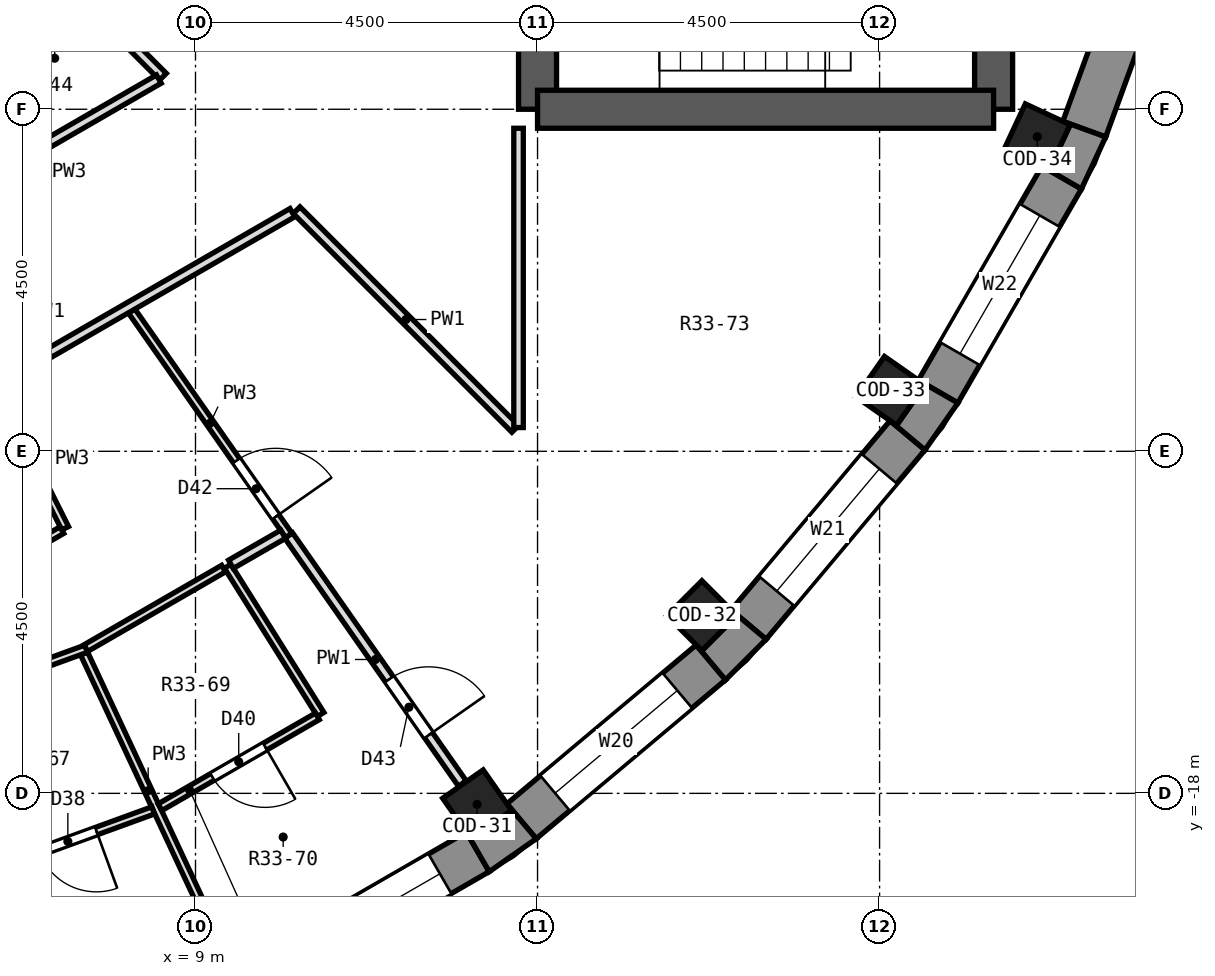
"""IFC4 building model, lengths in metres.
Left out: names, types, materials, properties, quantities, classifications, styles, units other than length and angle.
Written with IfcOpenShell. Run it as: python <this file> out.ifc"""

import sys

from ifc_helpers import new_model, si_unit, direction, frame, frame_2d, origin, origin_2d, place, context, subcontext, project, spatial, polyline, rectangle, outline, extrude, element, fill, save


model = new_model("IFC4")
c1 = context("Model", 3, precision=1e-05, world=origin(), true_north=direction((0.0, 1.0)))
c2 = subcontext(c1, "Body", "Model", "MODEL_VIEW")
j1 = project(units=[si_unit("LENGTHUNIT", "METRE"), si_unit("PLANEANGLEUNIT", "RADIAN")], contexts=[c1])
p1 = place(None, origin())
s1 = spatial("IfcSite", under=j1, at=p1, CompositionType="ELEMENT")
p2 = place(p1, origin())
s2 = spatial("IfcBuilding", under=s1, at=p2, CompositionType="ELEMENT")
p3 = place(p2, frame((0.0, 0.0, 229.7)))
s3 = spatial("IfcBuildingStorey", under=s2, at=p3, CompositionType="ELEMENT", Elevation=229.7)
for number, where, z_axis, x_axis in (
    (1, (12.705, -18.144, 0.0), (0.0, 0.0, 1.0), (0.574, -0.819, 0.0)),
    (2, (15.662, -15.662, 0.0), (0.0, 0.0, 1.0), (0.707, -0.707, 0.0)),
    (3, (18.144, -12.705, 0.0), (0.0, 0.0, 1.0), (0.819, -0.574, 0.0)),
    (4, (20.075, -9.361, 0.0), (0.0, 0.0, 1.0), (0.906, -0.423, 0.0)),
):
    element("IfcColumn", number, at=place(p3, frame(where, z_axis=z_axis, x_axis=x_axis)), inside=s3, PredefinedType="COLUMN", context=c2, shape_type="SweptSolid", body=[
        extrude(rectangle(XDim=0.65, YDim=0.65, at=origin_2d()), origin(), (0.0, 0.0, 1.0), 3.3),
    ])
p4 = place(p3, frame((13.5, -9.0, 0.0), z_axis=(0.0, 0.0, 1.0), x_axis=(0.0, 1.0, 0.0)))
e5 = element("IfcWall", 5, at=p4, inside=s3, PredefinedType="SHEAR", context=c2, shape_type="SweptSolid", body=[
    extrude(rectangle(XDim=18.0, YDim=0.5, at=frame_2d((9.0, 0.0))), origin(), (0.0, 0.0, 1.0), 3.3),
])
p5 = place(p4, frame((15.4, 0.0, 0.0)))
e6 = element("IfcOpeningElement", 6, at=p5, cuts=e5, PredefinedType="OPENING", context=c2, shape_type="SweptSolid", body=[
    extrude(rectangle(XDim=1.2, YDim=2.1, at=frame_2d((0.6, 1.05))), frame((0.0, 0.262, 0.0), z_axis=(0.0, -1.0, 0.0), x_axis=(1.0, 0.0, 0.0)), (0.0, 0.0, 1.0), 0.524),
])
p6 = place(p4, frame((1.4, 0.0, 0.0)))
e7 = element("IfcOpeningElement", 7, at=p6, cuts=e5, PredefinedType="OPENING", context=c2, shape_type="SweptSolid", body=[
    extrude(rectangle(XDim=1.2, YDim=2.1, at=frame_2d((0.6, 1.05))), frame((0.0, 0.262, 0.0), z_axis=(0.0, -1.0, 0.0), x_axis=(1.0, 0.0, 0.0)), (0.0, 0.0, 1.0), 0.524),
])
p7 = place(p4, frame((7.5, 0.0, 0.0)))
e8 = element("IfcOpeningElement", 8, at=p7, cuts=e5, PredefinedType="OPENING", context=c2, shape_type="SweptSolid", body=[
    extrude(rectangle(XDim=3.0, YDim=2.4, at=frame_2d((1.5, 1.2))), frame((0.0, 0.262, 0.0), z_axis=(0.0, -1.0, 0.0), x_axis=(1.0, 0.0, 0.0)), (0.0, 0.0, 1.0), 0.524),
])
p8 = place(p3, frame((19.5, -9.0, 0.0), z_axis=(0.0, 0.0, 1.0), x_axis=(0.0, 1.0, 0.0)))
e9 = element("IfcWall", 9, at=p8, inside=s3, PredefinedType="SHEAR", context=c2, shape_type="SweptSolid", body=[
    extrude(rectangle(XDim=18.0, YDim=0.5, at=frame_2d((9.0, 0.0))), origin(), (0.0, 0.0, 1.0), 3.3),
])
p9 = place(p8, frame((9.45, 0.0, 0.0)))
e10 = element("IfcOpeningElement", 10, at=p9, cuts=e9, PredefinedType="OPENING", context=c2, shape_type="SweptSolid", body=[
    extrude(rectangle(XDim=0.9, YDim=2.1, at=frame_2d((0.45, 1.05))), frame((0.0, 0.262, 0.0), z_axis=(0.0, -1.0, 0.0), x_axis=(1.0, 0.0, 0.0)), (0.0, 0.0, 1.0), 0.524),
])
p10 = place(p8, frame((7.65, 0.0, 0.0)))
e11 = element("IfcOpeningElement", 11, at=p10, cuts=e9, PredefinedType="OPENING", context=c2, shape_type="SweptSolid", body=[
    extrude(rectangle(XDim=0.9, YDim=2.1, at=frame_2d((0.45, 1.05))), frame((0.0, 0.262, 0.0), z_axis=(0.0, -1.0, 0.0), x_axis=(1.0, 0.0, 0.0)), (0.0, 0.0, 1.0), 0.524),
])
p11 = place(p3, frame((13.5, -9.0, 0.0), z_axis=(0.0, 0.0, 1.0), x_axis=(1.0, 0.0, 0.0)))
e12 = element("IfcWall", 12, at=p11, inside=s3, PredefinedType="SHEAR", context=c2, shape_type="SweptSolid", body=[
    extrude(rectangle(XDim=6.0, YDim=0.5, at=frame_2d((3.0, 0.0))), origin(), (0.0, 0.0, 1.0), 3.3),
])
p12 = place(p3, frame((9.898, -20.396, 0.0), z_axis=(0.0, 0.0, 1.0), x_axis=(0.866016800201, 0.500014901547, 0.0)))
e13 = element("IfcWall", 13, at=p12, inside=s3, PredefinedType="SOLIDWALL", context=c2, shape_type="SweptSolid", body=[
    extrude(rectangle(XDim=3.252, YDim=0.6, at=frame_2d((1.626, 0.0))), origin(), (0.0, 0.0, 1.0), 2.9),
])
p13 = place(p12, frame((0.576, 0.0, 0.9)))
e14 = element("IfcOpeningElement", 14, at=p13, cuts=e13, PredefinedType="OPENING", context=c2, shape_type="SweptSolid", body=[
    extrude(rectangle(XDim=2.1, YDim=1.8, at=frame_2d((1.05, 0.9))), frame((0.0, 0.312, 0.0), z_axis=(0.0, -1.0, 0.0), x_axis=(1.0, 0.0, 0.0)), (0.0, 0.0, 1.0), 0.624),
])
p14 = place(p3, frame((13.29, -18.367, 0.0), z_axis=(0.0, 0.0, 1.0), x_axis=(0.766056773982, 0.64277291405, 0.0)))
e15 = element("IfcWall", 15, at=p14, inside=s3, PredefinedType="SOLIDWALL", context=c2, shape_type="SweptSolid", body=[
    extrude(rectangle(XDim=3.252, YDim=0.6, at=frame_2d((1.626, 0.0))), origin(), (0.0, 0.0, 1.0), 2.9),
])
p15 = place(p14, frame((0.576, 0.0, 0.9)))
e16 = element("IfcOpeningElement", 16, at=p15, cuts=e15, PredefinedType="OPENING", context=c2, shape_type="SweptSolid", body=[
    extrude(rectangle(XDim=2.1, YDim=1.8, at=frame_2d((1.05, 0.9))), frame((0.0, 0.312, 0.0), z_axis=(0.0, -1.0, 0.0), x_axis=(1.0, 0.0, 0.0)), (0.0, 0.0, 1.0), 0.624),
])
p16 = place(p3, frame((16.277, -15.781, 0.0), z_axis=(0.0, 0.0, 1.0), x_axis=(0.64277291405, 0.766056773982, 0.0)))
e17 = element("IfcWall", 17, at=p16, inside=s3, PredefinedType="SOLIDWALL", context=c2, shape_type="SweptSolid", body=[
    extrude(rectangle(XDim=3.252, YDim=0.6, at=frame_2d((1.626, 0.0))), origin(), (0.0, 0.0, 1.0), 2.9),
])
p17 = place(p16, frame((0.576, 0.0, 0.9)))
e18 = element("IfcOpeningElement", 18, at=p17, cuts=e17, PredefinedType="OPENING", context=c2, shape_type="SweptSolid", body=[
    extrude(rectangle(XDim=2.1, YDim=1.8, at=frame_2d((1.05, 0.9))), frame((0.0, 0.312, 0.0), z_axis=(0.0, -1.0, 0.0), x_axis=(1.0, 0.0, 0.0)), (0.0, 0.0, 1.0), 0.624),
])
p18 = place(p3, frame((18.77, -12.714, 0.0), z_axis=(0.0, 0.0, 1.0), x_axis=(0.500014901547, 0.866016800201, 0.0)))
e19 = element("IfcWall", 19, at=p18, inside=s3, PredefinedType="SOLIDWALL", context=c2, shape_type="SweptSolid", body=[
    extrude(rectangle(XDim=3.252, YDim=0.6, at=frame_2d((1.626, 0.0))), origin(), (0.0, 0.0, 1.0), 2.9),
])
p19 = place(p18, frame((0.576, 0.0, 0.9)))
e20 = element("IfcOpeningElement", 20, at=p19, cuts=e19, PredefinedType="OPENING", context=c2, shape_type="SweptSolid", body=[
    extrude(rectangle(XDim=2.1, YDim=1.8, at=frame_2d((1.05, 0.9))), frame((0.0, 0.312, 0.0), z_axis=(0.0, -1.0, 0.0), x_axis=(1.0, 0.0, 0.0)), (0.0, 0.0, 1.0), 0.624),
])
p20 = place(p3, frame((20.693, -9.262, 0.0), z_axis=(0.0, 0.0, 1.0), x_axis=(0.342056509473, 0.939679383794, 0.0)))
e21 = element("IfcWall", 21, at=p20, inside=s3, PredefinedType="SOLIDWALL", context=c2, shape_type="SweptSolid", body=[
    extrude(rectangle(XDim=3.252, YDim=0.6, at=frame_2d((1.626, 0.0))), origin(), (0.0, 0.0, 1.0), 2.9),
])
p21 = place(p3, origin())
e22 = element("IfcWall", 22, at=p21, inside=s3, PredefinedType="SOLIDWALL", context=c2, shape_type="SweptSolid", body=[
    extrude(outline(polyline([(12.864, -19.03), (13.482, -18.597), (13.097, -18.137), (13.157, -18.224), (12.625, -18.597), (12.564, -18.51), (12.864, -19.03)])), origin(), (0.0, 0.0, 1.0), 2.9),
])
p22 = place(p3, origin())
e23 = element("IfcWall", 23, at=p22, inside=s3, PredefinedType="SOLIDWALL", context=c2, shape_type="SweptSolid", body=[
    extrude(outline(polyline([(16.507, -15.973), (16.047, -15.588), (16.122, -15.662), (15.662, -16.122), (15.588, -16.047), (15.973, -16.507), (16.507, -15.973)])), origin(), (0.0, 0.0, 1.0), 2.9),
])
p23 = place(p3, origin())
e24 = element("IfcWall", 24, at=p23, inside=s3, PredefinedType="SOLIDWALL", context=c2, shape_type="SweptSolid", body=[
    extrude(outline(polyline([(19.03, -12.864), (18.51, -12.564), (18.597, -12.625), (18.224, -13.157), (18.137, -13.097), (18.597, -13.482), (19.03, -12.864)])), origin(), (0.0, 0.0, 1.0), 2.9),
])
p24 = place(p3, origin())
e25 = element("IfcWall", 25, at=p24, inside=s3, PredefinedType="SOLIDWALL", context=c2, shape_type="SweptSolid", body=[
    extrude(outline(polyline([(20.656, -10.048), (20.975, -9.364), (20.411, -9.159), (20.507, -9.204), (20.232, -9.793), (20.136, -9.748), (20.656, -10.048)])), origin(), (0.0, 0.0, 1.0), 2.9),
])
p25 = place(p3, frame((7.534, -16.16, 0.0), z_axis=(0.0, 0.0, 1.0), x_axis=(0.423136981181, -0.90606572342, 0.0)))
e26 = element("IfcWall", 26, at=p25, inside=s3, PredefinedType="PARTITIONING", context=c2, shape_type="SweptSolid", body=[
    extrude(rectangle(XDim=3.985, YDim=0.1, at=frame_2d((1.993, 0.0))), origin(), (0.0, 0.0, 1.0), 2.9),
])
p26 = place(p3, frame((6.369, -12.688, 0.0), z_axis=(0.0, 0.0, 1.0), x_axis=(0.448648311547, -0.893708393463, 0.0)))
e27 = element("IfcWall", 27, at=p26, inside=s3, PredefinedType="PARTITIONING", context=c2, shape_type="SweptSolid", body=[
    extrude(rectangle(XDim=2.041, YDim=0.1, at=frame_2d((1.021, 0.0))), origin(), (0.0, 0.0, 1.0), 2.9),
])
p27 = place(p3, frame((9.423, -15.012, 0.0), z_axis=(0.0, 0.0, 1.0), x_axis=(0.531608930636, -0.846989931975, 0.0)))
e28 = element("IfcWall", 28, at=p27, inside=s3, PredefinedType="PARTITIONING", context=c2, shape_type="SweptSolid", body=[
    extrude(rectangle(XDim=2.302, YDim=0.1, at=frame_2d((1.151, 0.0))), origin(), (0.0, 0.0, 1.0), 2.9),
])
p28 = place(p3, frame((10.225, -14.607, 0.0), z_axis=(0.0, 0.0, 1.0), x_axis=(0.573696694948, -0.819067825156, 0.0)))
e29 = element("IfcWall", 29, at=p28, inside=s3, PredefinedType="PARTITIONING", context=c2, shape_type="SweptSolid", body=[
    extrude(rectangle(XDim=3.985, YDim=0.125, at=frame_2d((1.992, 0.0))), origin(), (0.0, 0.0, 1.0), 2.9),
])
p29 = place(p28, frame((2.309, 0.0, 0.0)))
e30 = element("IfcOpeningElement", 30, at=p29, cuts=e29, PredefinedType="OPENING", context=c2, shape_type="SweptSolid", body=[
    extrude(rectangle(XDim=0.9, YDim=2.1, at=frame_2d((0.45, 1.05))), frame((0.0, 0.074, 0.0), z_axis=(0.0, -1.0, 0.0), x_axis=(1.0, 0.0, 0.0)), (0.0, 0.0, 1.0), 0.149),
])
p30 = place(p3, frame((8.16, -11.654, 0.0), z_axis=(0.0, 0.0, 1.0), x_axis=(0.573580547772, -0.819149165426, 0.0)))
e31 = element("IfcWall", 31, at=p30, inside=s3, PredefinedType="PARTITIONING", context=c2, shape_type="SweptSolid", body=[
    extrude(rectangle(XDim=3.604, YDim=0.1, at=frame_2d((1.802, 0.0))), origin(), (0.0, 0.0, 1.0), 2.9),
])
p31 = place(p30, frame((2.405, 0.0, 0.0)))
e32 = element("IfcOpeningElement", 32, at=p31, cuts=e31, PredefinedType="OPENING", context=c2, shape_type="SweptSolid", body=[
    extrude(rectangle(XDim=0.9, YDim=2.1, at=frame_2d((0.45, 1.05))), frame((0.0, 0.062, 0.0), z_axis=(0.0, -1.0, 0.0), x_axis=(1.0, 0.0, 0.0)), (0.0, 0.0, 1.0), 0.124),
])
p32 = place(p3, frame((6.677, -6.677, 0.0), z_axis=(0.0, 0.0, 1.0), x_axis=(0.707106781187, -0.707106781187, 0.0)))
e33 = element("IfcWall", 33, at=p32, inside=s3, PredefinedType="PARTITIONING", context=c2, shape_type="SweptSolid", body=[
    extrude(rectangle(XDim=2.68, YDim=0.125, at=frame_2d((1.34, 0.0))), origin(), (0.0, 0.0, 1.0), 2.9),
])
p33 = place(p3, frame((10.33, -10.328, 0.0), z_axis=(0.0, 0.0, 1.0), x_axis=(0.707076776443, -0.707136784657, 0.0)))
e34 = element("IfcWall", 34, at=p33, inside=s3, PredefinedType="PARTITIONING", context=c2, shape_type="SweptSolid", body=[
    extrude(rectangle(XDim=4.068, YDim=0.125, at=frame_2d((2.034, 0.0))), origin(), (0.0, 0.0, 1.0), 2.9),
])
p34 = place(p3, frame((6.197, -19.042, 0.0), z_axis=(0.0, 0.0, 1.0), x_axis=(0.939644231496, 0.342153062556, 0.0)))
e35 = element("IfcWall", 35, at=p34, inside=s3, PredefinedType="PARTITIONING", context=c2, shape_type="SweptSolid", body=[
    extrude(rectangle(XDim=2.39, YDim=0.1, at=frame_2d((1.195, 0.0))), origin(), (0.0, 0.0, 1.0), 2.9),
])
p35 = place(p34, frame((0.796, 0.0, 0.0)))
e36 = element("IfcOpeningElement", 36, at=p35, cuts=e35, PredefinedType="OPENING", context=c2, shape_type="SweptSolid", body=[
    extrude(rectangle(XDim=0.8, YDim=2.1, at=frame_2d((0.4, 1.05))), frame((0.0, 0.062, 0.0), z_axis=(0.0, -1.0, 0.0), x_axis=(1.0, 0.0, 0.0)), (0.0, 0.0, 1.0), 0.124),
])
p36 = place(p3, frame((5.49, -16.851, 0.0), z_axis=(0.0, 0.0, 1.0), x_axis=(0.939680214162, 0.342054228323, 0.0)))
e37 = element("IfcWall", 37, at=p36, inside=s3, PredefinedType="PARTITIONING", context=c2, shape_type="SweptSolid", body=[
    extrude(rectangle(XDim=2.205, YDim=0.1, at=frame_2d((1.103, 0.0))), origin(), (0.0, 0.0, 1.0), 2.9),
])
p37 = place(p3, frame((9.466, -14.986, 0.0), z_axis=(0.0, 0.0, 1.0), x_axis=(0.866569975824, 0.499055585082, 0.0)))
e38 = element("IfcWall", 38, at=p37, inside=s3, PredefinedType="PARTITIONING", context=c2, shape_type="SweptSolid", body=[
    extrude(rectangle(XDim=0.792, YDim=0.125, at=frame_2d((0.396, 0.0))), origin(), (0.0, 0.0, 1.0), 2.9),
])
p38 = place(p3, frame((8.533, -18.182, 0.0), z_axis=(0.0, 0.0, 1.0), x_axis=(0.866136275394, 0.49980791555, 0.0)))
e39 = element("IfcWall", 39, at=p38, inside=s3, PredefinedType="PARTITIONING", context=c2, shape_type="SweptSolid", body=[
    extrude(rectangle(XDim=2.391, YDim=0.1, at=frame_2d((1.195, 0.0))), origin(), (0.0, 0.0, 1.0), 2.9),
])
p39 = place(p38, frame((0.795, 0.0, 0.0)))
e40 = element("IfcOpeningElement", 40, at=p39, cuts=e39, PredefinedType="OPENING", context=c2, shape_type="SweptSolid", body=[
    extrude(rectangle(XDim=0.8, YDim=2.1, at=frame_2d((0.4, 1.05))), frame((0.0, 0.062, 0.0), z_axis=(0.0, -1.0, 0.0), x_axis=(1.0, 0.0, 0.0)), (0.0, 0.0, 1.0), 0.124),
])
p40 = place(p3, frame((7.557, -16.089, 0.0), z_axis=(0.0, 0.0, 1.0), x_axis=(0.866022320763, 0.500005339912, 0.0)))
e41 = element("IfcWall", 41, at=p40, inside=s3, PredefinedType="PARTITIONING", context=c2, shape_type="SweptSolid", body=[
    extrude(rectangle(XDim=2.092, YDim=0.1, at=frame_2d((1.046, 0.0))), origin(), (0.0, 0.0, 1.0), 2.9),
])
p41 = place(p3, frame((5.419, -15.589, 0.0), z_axis=(0.0, 0.0, 1.0), x_axis=(0.866071606143, 0.499919966627, 0.0)))
e42 = element("IfcWall", 42, at=p41, inside=s3, PredefinedType="PARTITIONING", context=c2, shape_type="SweptSolid", body=[
    extrude(rectangle(XDim=2.104, YDim=0.1, at=frame_2d((1.052, 0.0))), origin(), (0.0, 0.0, 1.0), 2.9),
])
p42 = place(p41, frame((0.652, 0.0, 0.0)))
e43 = element("IfcOpeningElement", 43, at=p42, cuts=e42, PredefinedType="OPENING", context=c2, shape_type="SweptSolid", body=[
    extrude(rectangle(XDim=0.8, YDim=2.1, at=frame_2d((0.4, 1.05))), frame((0.0, 0.062, 0.0), z_axis=(0.0, -1.0, 0.0), x_axis=(1.0, 0.0, 0.0)), (0.0, 0.0, 1.0), 0.124),
])
p43 = place(p3, frame((3.835, -14.079, 0.0), z_axis=(0.0, 0.0, 1.0), x_axis=(0.865993671729, 0.500054957505, 0.0)))
e44 = element("IfcWall", 44, at=p43, inside=s3, PredefinedType="PARTITIONING", context=c2, shape_type="SweptSolid", body=[
    extrude(rectangle(XDim=7.436, YDim=0.125, at=frame_2d((3.718, 0.0))), origin(), (0.0, 0.0, 1.0), 2.9),
])
p44 = place(p3, frame((3.203, -11.673, 0.0), z_axis=(0.0, 0.0, 1.0), x_axis=(0.865972267571, 0.50009202333, 0.0)))
e45 = element("IfcWall", 45, at=p44, inside=s3, PredefinedType="PARTITIONING", context=c2, shape_type="SweptSolid", body=[
    extrude(rectangle(XDim=6.137, YDim=0.125, at=frame_2d((3.069, 0.0))), origin(), (0.0, 0.0, 1.0), 2.9),
])
p45 = place(p44, frame((2.512, 0.0, 0.0)))
e46 = element("IfcOpeningElement", 46, at=p45, cuts=e45, PredefinedType="OPENING", context=c2, shape_type="SweptSolid", body=[
    extrude(rectangle(XDim=1.0, YDim=2.1, at=frame_2d((0.5, 1.05))), frame((0.0, 0.074, 0.0), z_axis=(0.0, -1.0, 0.0), x_axis=(1.0, 0.0, 0.0)), (0.0, 0.0, 1.0), 0.149),
])
p46 = place(p3, frame((13.25, -13.188, 0.0), z_axis=(0.0, 0.0, 1.0), x_axis=(0.0, 1.0, 0.0)))
e47 = element("IfcWall", 47, at=p46, inside=s3, PredefinedType="PARTITIONING", context=c2, shape_type="SweptSolid", body=[
    extrude(rectangle(XDim=3.938, YDim=0.125, at=frame_2d((1.969, 0.0))), origin(), (0.0, 0.0, 1.0), 2.9),
])
p47 = place(p13, origin())
e48 = element("IfcWindow", 48, at=p47, inside=s3, PartitioningType="SINGLE_PANEL", PredefinedType="WINDOW", context=c2, shape_type="SweptSolid", body=[
    extrude(rectangle(XDim=2.1, YDim=1.8, at=frame_2d((1.05, 0.9))), frame((0.0, 0.18, 0.0), z_axis=(0.0, -1.0, 0.0), x_axis=(1.0, 0.0, 0.0)), (0.0, 0.0, 1.0), 0.06),
])
fill(e14, e48)
p48 = place(p15, origin())
e49 = element("IfcWindow", 49, at=p48, inside=s3, PartitioningType="SINGLE_PANEL", PredefinedType="WINDOW", context=c2, shape_type="SweptSolid", body=[
    extrude(rectangle(XDim=2.1, YDim=1.8, at=frame_2d((1.05, 0.9))), frame((0.0, 0.18, 0.0), z_axis=(0.0, -1.0, 0.0), x_axis=(1.0, 0.0, 0.0)), (0.0, 0.0, 1.0), 0.06),
])
fill(e16, e49)
p49 = place(p17, origin())
e50 = element("IfcWindow", 50, at=p49, inside=s3, PartitioningType="SINGLE_PANEL", PredefinedType="WINDOW", context=c2, shape_type="SweptSolid", body=[
    extrude(rectangle(XDim=2.1, YDim=1.8, at=frame_2d((1.05, 0.9))), frame((0.0, 0.18, 0.0), z_axis=(0.0, -1.0, 0.0), x_axis=(1.0, 0.0, 0.0)), (0.0, 0.0, 1.0), 0.06),
])
fill(e18, e50)
p50 = place(p19, origin())
e51 = element("IfcWindow", 51, at=p50, inside=s3, PartitioningType="SINGLE_PANEL", PredefinedType="WINDOW", context=c2, shape_type="SweptSolid", body=[
    extrude(rectangle(XDim=2.1, YDim=1.8, at=frame_2d((1.05, 0.9))), frame((0.0, 0.18, 0.0), z_axis=(0.0, -1.0, 0.0), x_axis=(1.0, 0.0, 0.0)), (0.0, 0.0, 1.0), 0.06),
])
fill(e20, e51)
p51 = place(p35, frame((0.8, 0.0, 0.0), z_axis=(0.0, 0.0, 1.0), x_axis=(-1.0, 0.0, 0.0)))
e52 = element("IfcDoor", 52, at=p51, inside=s3, OperationType="SINGLE_SWING_LEFT", PredefinedType="DOOR", context=c2, shape_type="SweptSolid", body=[
    extrude(rectangle(XDim=0.8, YDim=2.1, at=frame_2d((0.4, 1.05))), frame((0.0, 0.025, 0.0), z_axis=(0.0, -1.0, 0.0), x_axis=(1.0, 0.0, 0.0)), (0.0, 0.0, 1.0), 0.05),
])
fill(e36, e52)
p52 = place(p39, frame((0.8, 0.0, 0.0), z_axis=(0.0, 0.0, 1.0), x_axis=(-1.0, 0.0, 0.0)))
e53 = element("IfcDoor", 53, at=p52, inside=s3, OperationType="SINGLE_SWING_LEFT", PredefinedType="DOOR", context=c2, shape_type="SweptSolid", body=[
    extrude(rectangle(XDim=0.8, YDim=2.1, at=frame_2d((0.4, 1.05))), frame((0.0, 0.025, 0.0), z_axis=(0.0, -1.0, 0.0), x_axis=(1.0, 0.0, 0.0)), (0.0, 0.0, 1.0), 0.05),
])
fill(e40, e53)
p53 = place(p31, origin())
e54 = element("IfcDoor", 54, at=p53, inside=s3, OperationType="SINGLE_SWING_RIGHT", PredefinedType="DOOR", context=c2, shape_type="SweptSolid", body=[
    extrude(rectangle(XDim=0.9, YDim=2.1, at=frame_2d((0.45, 1.05))), frame((0.0, 0.025, 0.0), z_axis=(0.0, -1.0, 0.0), x_axis=(1.0, 0.0, 0.0)), (0.0, 0.0, 1.0), 0.05),
])
fill(e32, e54)
p54 = place(p29, origin())
e55 = element("IfcDoor", 55, at=p54, inside=s3, OperationType="SINGLE_SWING_RIGHT", PredefinedType="DOOR", context=c2, shape_type="SweptSolid", body=[
    extrude(rectangle(XDim=0.9, YDim=2.1, at=frame_2d((0.45, 1.05))), frame((0.0, 0.025, 0.0), z_axis=(0.0, -1.0, 0.0), x_axis=(1.0, 0.0, 0.0)), (0.0, 0.0, 1.0), 0.05),
])
fill(e30, e55)
save(model, sys.argv[1])
